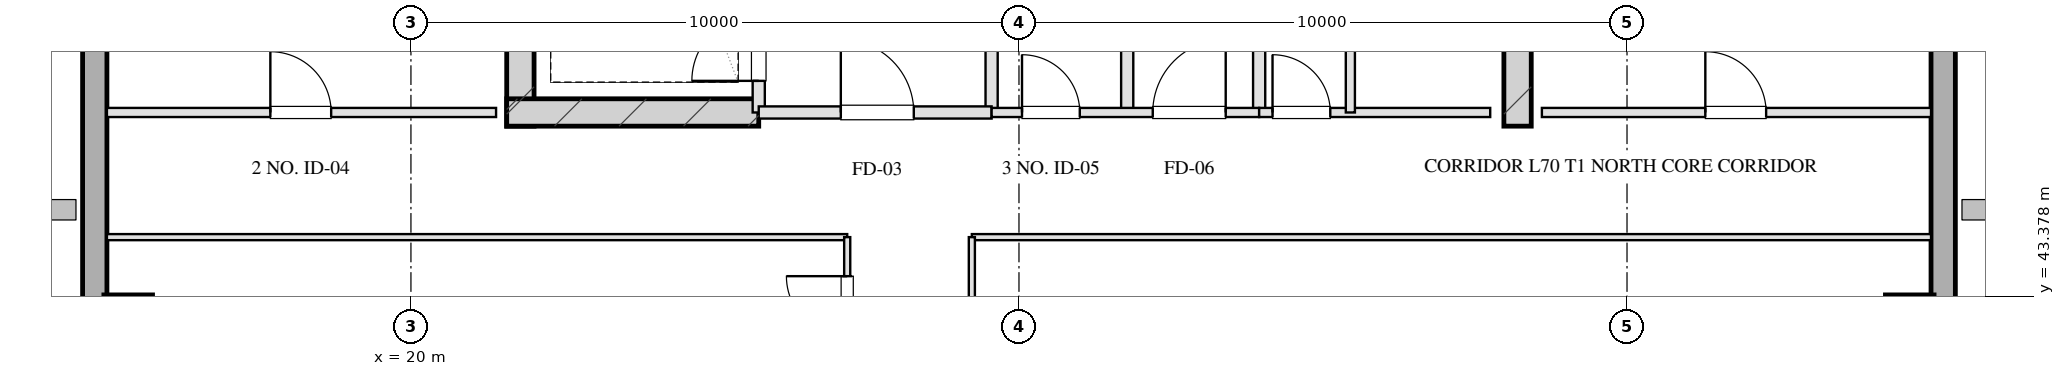
"""IFC4 building model, lengths in metres.
Left out: names, types, materials, properties, quantities, classifications, styles, units other than length and angle.
Written with IfcOpenShell. Run it as: python <this file> out.ifc"""

import sys

from ifc_helpers import new_model, si_unit, direction, frame, frame_2d, origin, origin_2d, place, context, subcontext, project, spatial, rectangle, hollow_rectangle, extrude, element, fill, save


model = new_model("IFC4")
c1 = context("Model", 3, precision=1e-05, world=origin(), true_north=direction((0.0, 1.0)))
c2 = subcontext(c1, "Body", "Model", "MODEL_VIEW")
j1 = project(units=[si_unit("LENGTHUNIT", "METRE"), si_unit("PLANEANGLEUNIT", "RADIAN")], contexts=[c1])
p1 = place(None, origin())
s1 = spatial("IfcSite", under=j1, at=p1, CompositionType="ELEMENT")
p2 = place(p1, origin())
s2 = spatial("IfcBuilding", under=s1, at=p2, CompositionType="ELEMENT")
p3 = place(p2, frame((0.0, 0.0, 256.8)))
s3 = spatial("IfcBuildingStorey", under=s2, at=p3, CompositionType="ELEMENT", Elevation=256.8)
for number, where, z_axis, x_axis in (
    (1, (21.8, 46.175, 0.0), (0.0, 0.0, 1.0), (0.0, 1.0, 0.0)),
    (2, (38.2, 46.175, 0.0), (0.0, 0.0, 1.0), (0.0, 1.0, 0.0)),
):
    element("IfcWall", number, at=place(p3, frame(where, z_axis=z_axis, x_axis=x_axis)), inside=s3, PredefinedType="SHEAR", context=c2, shape_type="SweptSolid", body=[
        extrude(rectangle(XDim=9.33, YDim=0.45, at=frame_2d((4.665, 0.0))), origin(), (0.0, 0.0, 1.0), 3.2),
    ])
p4 = place(p3, frame((21.575, 46.4, 0.0), z_axis=(0.0, 0.0, 1.0), x_axis=(1.0, 0.0, 0.0)))
e3 = element("IfcWall", 3, at=p4, inside=s3, PredefinedType="SHEAR", context=c2, shape_type="SweptSolid", body=[
    extrude(rectangle(XDim=4.145, YDim=0.45, at=frame_2d((2.073, 0.0))), origin(), (0.0, 0.0, 1.0), 3.2),
])
for number, where, z_axis, x_axis in (
    (4, (15.35, 43.0, 0.0), (0.0, 0.0, 1.0), (1.0, 0.0, 0.0)),
    (5, (44.65, 43.0, 0.0), (0.0, 0.0, 1.0), (1.0, 0.0, 0.0)),
):
    element("IfcColumn", number, at=place(p3, frame(where, z_axis=z_axis, x_axis=x_axis)), inside=s3, PredefinedType="COLUMN", context=c2, shape_type="SweptSolid", body=[
        extrude(hollow_rectangle(XDim=0.8, YDim=0.8, WallThickness=0.028, at=origin_2d()), origin(), (0.0, 0.0, 1.0), 3.201),
    ])
p5 = place(p3, frame((14.8, 13.1, 0.0), z_axis=(0.0, 0.0, 1.0), x_axis=(0.0, 1.0, 0.0)))
e6 = element("IfcWall", 6, at=p5, inside=s3, PredefinedType="SOLIDWALL", context=c2, shape_type="SweptSolid", body=[
    extrude(rectangle(XDim=41.8, YDim=0.4, at=frame_2d((20.9, 0.0))), origin(), (0.0, 0.0, 1.0), 2.36),
])
p6 = place(p5, frame((22.525, 0.0, 0.75)))
e7 = element("IfcOpeningElement", 7, at=p6, cuts=e6, PredefinedType="OPENING", context=c2, shape_type="SweptSolid", body=[
    extrude(rectangle(XDim=1.95, YDim=1.21, at=frame_2d((0.975, 0.605))), frame((0.0, 0.21, 0.0), z_axis=(0.0, -1.0, 0.0), x_axis=(1.0, 0.0, 0.0)), (0.0, 0.0, 1.0), 0.42),
])
p7 = place(p5, frame((26.325, 0.0, 0.75)))
e8 = element("IfcOpeningElement", 8, at=p7, cuts=e6, PredefinedType="OPENING", context=c2, shape_type="SweptSolid", body=[
    extrude(rectangle(XDim=1.95, YDim=1.21, at=frame_2d((0.975, 0.605))), frame((0.0, 0.21, 0.0), z_axis=(0.0, -1.0, 0.0), x_axis=(1.0, 0.0, 0.0)), (0.0, 0.0, 1.0), 0.42),
])
p8 = place(p5, frame((14.55, 0.0, 0.0)))
e9 = element("IfcOpeningElement", 9, at=p8, cuts=e6, PredefinedType="OPENING", context=c2, shape_type="SweptSolid", body=[
    extrude(rectangle(XDim=1.1, YDim=2.15, at=frame_2d((0.55, 1.075))), frame((0.0, 0.21, 0.0), z_axis=(0.0, -1.0, 0.0), x_axis=(1.0, 0.0, 0.0)), (0.0, 0.0, 1.0), 0.42),
])
p9 = place(p3, frame((45.2, 54.9, 0.0), z_axis=(0.0, 0.0, 1.0), x_axis=(0.0, -1.0, 0.0)))
e10 = element("IfcWall", 10, at=p9, inside=s3, PredefinedType="SOLIDWALL", context=c2, shape_type="SweptSolid", body=[
    extrude(rectangle(XDim=41.8, YDim=0.4, at=frame_2d((20.9, 0.0))), origin(), (0.0, 0.0, 1.0), 2.36),
])
p10 = place(p9, frame((17.325, 0.0, 0.75)))
e11 = element("IfcOpeningElement", 11, at=p10, cuts=e10, PredefinedType="OPENING", context=c2, shape_type="SweptSolid", body=[
    extrude(rectangle(XDim=1.95, YDim=1.21, at=frame_2d((0.975, 0.605))), frame((0.0, 0.21, 0.0), z_axis=(0.0, -1.0, 0.0), x_axis=(1.0, 0.0, 0.0)), (0.0, 0.0, 1.0), 0.42),
])
p11 = place(p9, frame((13.525, 0.0, 0.75)))
e12 = element("IfcOpeningElement", 12, at=p11, cuts=e10, PredefinedType="OPENING", context=c2, shape_type="SweptSolid", body=[
    extrude(rectangle(XDim=1.95, YDim=1.21, at=frame_2d((0.975, 0.605))), frame((0.0, 0.21, 0.0), z_axis=(0.0, -1.0, 0.0), x_axis=(1.0, 0.0, 0.0)), (0.0, 0.0, 1.0), 0.42),
])
p12 = place(p9, frame((23.45, 0.0, 0.0)))
e13 = element("IfcOpeningElement", 13, at=p12, cuts=e10, PredefinedType="OPENING", context=c2, shape_type="SweptSolid", body=[
    extrude(rectangle(XDim=1.1, YDim=2.15, at=frame_2d((0.55, 1.075))), frame((0.0, 0.21, 0.0), z_axis=(0.0, -1.0, 0.0), x_axis=(1.0, 0.0, 0.0)), (0.0, 0.0, 1.0), 0.42),
])
p13 = place(p3, frame((25.72, 46.4, 0.0), z_axis=(0.0, 0.0, 1.0), x_axis=(0.0, 1.0, 0.0)))
e14 = element("IfcWall", 14, at=p13, inside=s3, PredefinedType="PARTITIONING", context=c2, shape_type="SweptSolid", body=[
    extrude(rectangle(XDim=1.9, YDim=0.2, at=frame_2d((0.95, 0.0))), origin(), (0.0, 0.0, 1.0), 2.925),
])
p14 = place(p13, frame((0.52, 0.0, 0.0)))
e15 = element("IfcOpeningElement", 15, at=p14, cuts=e14, PredefinedType="OPENING", context=c2, shape_type="SweptSolid", body=[
    extrude(rectangle(XDim=1.1, YDim=2.05, at=frame_2d((0.55, 1.025))), frame((0.0, 0.11, 0.0), z_axis=(0.0, -1.0, 0.0), x_axis=(1.0, 0.0, 0.0)), (0.0, 0.0, 1.0), 0.22),
])
p15 = place(p3, frame((29.55, 46.4, 0.0), z_axis=(0.0, 0.0, 1.0), x_axis=(0.0, 1.0, 0.0)))
e16 = element("IfcWall", 16, at=p15, inside=s3, PredefinedType="PARTITIONING", context=c2, shape_type="SweptSolid", body=[
    extrude(rectangle(XDim=8.43, YDim=0.2, at=frame_2d((4.215, 0.0))), origin(), (0.0, 0.0, 1.0), 2.925),
])
p16 = place(p3, frame((25.72, 46.4, 0.0), z_axis=(0.0, 0.0, 1.0), x_axis=(1.0, 0.0, 0.0)))
e17 = element("IfcWall", 17, at=p16, inside=s3, PredefinedType="PARTITIONING", context=c2, shape_type="SweptSolid", body=[
    extrude(rectangle(XDim=3.83, YDim=0.2, at=frame_2d((1.915, 0.0))), origin(), (0.0, 0.0, 1.0), 2.925),
])
p17 = place(p16, frame((1.35, 0.0, 0.0)))
e18 = element("IfcOpeningElement", 18, at=p17, cuts=e17, PredefinedType="OPENING", context=c2, shape_type="SweptSolid", body=[
    extrude(rectangle(XDim=1.2, YDim=2.05, at=frame_2d((0.6, 1.025))), frame((0.0, 0.11, 0.0), z_axis=(0.0, -1.0, 0.0), x_axis=(1.0, 0.0, 0.0)), (0.0, 0.0, 1.0), 0.22),
])
for number, where, z_axis, x_axis in (
    (19, (33.95, 46.4, 0.0), (0.0, 0.0, 1.0), (0.0, 1.0, 0.0)),
    (20, (31.78, 46.4, 0.0), (0.0, 0.0, 1.0), (0.0, 1.0, 0.0)),
):
    element("IfcWall", number, at=place(p3, frame(where, z_axis=z_axis, x_axis=x_axis)), inside=s3, PredefinedType="PARTITIONING", context=c2, shape_type="SweptSolid", body=[
        extrude(rectangle(XDim=8.43, YDim=0.2, at=frame_2d((4.215, 0.0))), origin(), (0.0, 0.0, 1.0), 2.925),
    ])
p18 = place(p3, frame((29.55, 46.4, 0.0), z_axis=(0.0, 0.0, 1.0), x_axis=(1.0, 0.0, 0.0)))
e21 = element("IfcWall", 21, at=p18, inside=s3, PredefinedType="PARTITIONING", context=c2, shape_type="SweptSolid", body=[
    extrude(rectangle(XDim=4.4, YDim=0.15, at=frame_2d((2.2, 0.0))), origin(), (0.0, 0.0, 1.0), 2.925),
])
p19 = place(p18, frame((0.5, 0.0, 0.0)))
e22 = element("IfcOpeningElement", 22, at=p19, cuts=e21, PredefinedType="OPENING", context=c2, shape_type="SweptSolid", body=[
    extrude(rectangle(XDim=0.95, YDim=2.05, at=frame_2d((0.475, 1.025))), frame((0.0, 0.085, 0.0), z_axis=(0.0, -1.0, 0.0), x_axis=(1.0, 0.0, 0.0)), (0.0, 0.0, 1.0), 0.17),
])
p20 = place(p18, frame((2.65, 0.0, 0.0)))
e23 = element("IfcOpeningElement", 23, at=p20, cuts=e21, PredefinedType="OPENING", context=c2, shape_type="SweptSolid", body=[
    extrude(rectangle(XDim=1.2, YDim=2.05, at=frame_2d((0.6, 1.025))), frame((0.0, 0.085, 0.0), z_axis=(0.0, -1.0, 0.0), x_axis=(1.0, 0.0, 0.0)), (0.0, 0.0, 1.0), 0.17),
])
p21 = place(p3, frame((33.95, 46.4, 0.0), z_axis=(0.0, 0.0, 1.0), x_axis=(1.0, 0.0, 0.0)))
e24 = element("IfcWall", 24, at=p21, inside=s3, PredefinedType="PARTITIONING", context=c2, shape_type="SweptSolid", body=[
    extrude(rectangle(XDim=3.8, YDim=0.15, at=frame_2d((1.9, 0.0))), origin(), (0.0, 0.0, 1.0), 2.925),
])
p22 = place(p21, frame((0.22, 0.0, 0.0)))
e25 = element("IfcOpeningElement", 25, at=p22, cuts=e24, PredefinedType="OPENING", context=c2, shape_type="SweptSolid", body=[
    extrude(rectangle(XDim=0.95, YDim=2.05, at=frame_2d((0.475, 1.025))), frame((0.0, 0.085, 0.0), z_axis=(0.0, -1.0, 0.0), x_axis=(1.0, 0.0, 0.0)), (0.0, 0.0, 1.0), 0.17),
])
p23 = place(p3, frame((35.45, 46.4, 0.0), z_axis=(0.0, 0.0, 1.0), x_axis=(0.0, 1.0, 0.0)))
e26 = element("IfcWall", 26, at=p23, inside=s3, PredefinedType="PARTITIONING", context=c2, shape_type="SweptSolid", body=[
    extrude(rectangle(XDim=8.43, YDim=0.15, at=frame_2d((4.215, 0.0))), origin(), (0.0, 0.0, 1.0), 2.515),
])
p24 = place(p23, frame((2.55, 0.0, 0.0)))
e27 = element("IfcOpeningElement", 27, at=p24, cuts=e26, PredefinedType="OPENING", context=c2, shape_type="SweptSolid", body=[
    extrude(rectangle(XDim=0.95, YDim=2.05, at=frame_2d((0.475, 1.025))), frame((0.0, 0.085, 0.0), z_axis=(0.0, -1.0, 0.0), x_axis=(1.0, 0.0, 0.0)), (0.0, 0.0, 1.0), 0.17),
])
p25 = place(p23, frame((4.7, 0.0, 0.0)))
e28 = element("IfcOpeningElement", 28, at=p25, cuts=e26, PredefinedType="OPENING", context=c2, shape_type="SweptSolid", body=[
    extrude(rectangle(XDim=0.9, YDim=2.05, at=frame_2d((0.45, 1.025))), frame((0.0, 0.085, 0.0), z_axis=(0.0, -1.0, 0.0), x_axis=(1.0, 0.0, 0.0)), (0.0, 0.0, 1.0), 0.17),
])
p26 = place(p23, frame((6.8, 0.0, 0.0)))
e29 = element("IfcOpeningElement", 29, at=p26, cuts=e26, PredefinedType="OPENING", context=c2, shape_type="SweptSolid", body=[
    extrude(rectangle(XDim=0.9, YDim=2.05, at=frame_2d((0.45, 1.025))), frame((0.0, 0.085, 0.0), z_axis=(0.0, -1.0, 0.0), x_axis=(1.0, 0.0, 0.0)), (0.0, 0.0, 1.0), 0.17),
])
p27 = place(p3, frame((15.0, 46.4, 0.0), z_axis=(0.0, 0.0, 1.0), x_axis=(1.0, 0.0, 0.0)))
e30 = element("IfcWall", 30, at=p27, inside=s3, PredefinedType="PARTITIONING", context=c2, shape_type="SweptSolid", body=[
    extrude(rectangle(XDim=6.4, YDim=0.15, at=frame_2d((3.2, 0.0))), origin(), (0.0, 0.0, 1.0), 2.925),
])
p28 = place(p27, frame((2.688, 0.0, 0.0)))
e31 = element("IfcOpeningElement", 31, at=p28, cuts=e30, PredefinedType="OPENING", context=c2, shape_type="SweptSolid", body=[
    extrude(rectangle(XDim=1.0, YDim=2.05, at=frame_2d((0.5, 1.025))), frame((0.0, 0.085, 0.0), z_axis=(0.0, -1.0, 0.0), x_axis=(1.0, 0.0, 0.0)), (0.0, 0.0, 1.0), 0.17),
])
p29 = place(p3, frame((38.6, 46.4, 0.0), z_axis=(0.0, 0.0, 1.0), x_axis=(1.0, 0.0, 0.0)))
e32 = element("IfcWall", 32, at=p29, inside=s3, PredefinedType="PARTITIONING", context=c2, shape_type="SweptSolid", body=[
    extrude(rectangle(XDim=6.4, YDim=0.15, at=frame_2d((3.2, 0.0))), origin(), (0.0, 0.0, 1.0), 2.925),
])
p30 = place(p29, frame((2.688, 0.0, 0.0)))
e33 = element("IfcOpeningElement", 33, at=p30, cuts=e32, PredefinedType="OPENING", context=c2, shape_type="SweptSolid", body=[
    extrude(rectangle(XDim=1.0, YDim=2.05, at=frame_2d((0.5, 1.025))), frame((0.0, 0.085, 0.0), z_axis=(0.0, -1.0, 0.0), x_axis=(1.0, 0.0, 0.0)), (0.0, 0.0, 1.0), 0.17),
])
p31 = place(p3, frame((15.0, 44.35, 0.0), z_axis=(0.0, 0.0, 1.0), x_axis=(1.0, 0.0, 0.0)))
e34 = element("IfcWall", 34, at=p31, inside=s3, PredefinedType="MOVABLE", context=c2, shape_type="SweptSolid", body=[
    extrude(rectangle(XDim=12.175, YDim=0.1, at=frame_2d((6.087, 0.0))), origin(), (0.0, 0.0, 1.0), 2.925),
])
p32 = place(p3, frame((29.225, 44.35, 0.0), z_axis=(0.0, 0.0, 1.0), x_axis=(1.0, 0.0, 0.0)))
e35 = element("IfcWall", 35, at=p32, inside=s3, PredefinedType="MOVABLE", context=c2, shape_type="SweptSolid", body=[
    extrude(rectangle(XDim=15.775, YDim=0.1, at=frame_2d((7.887, 0.0))), origin(), (0.0, 0.0, 1.0), 2.925),
])
p33 = place(p3, frame((27.175, 23.65, 0.0), z_axis=(0.0, 0.0, 1.0), x_axis=(0.0, 1.0, 0.0)))
e36 = element("IfcWall", 36, at=p33, inside=s3, PredefinedType="MOVABLE", context=c2, shape_type="SweptSolid", body=[
    extrude(rectangle(XDim=20.7, YDim=0.1, at=frame_2d((10.35, 0.0))), origin(), (0.0, 0.0, 1.0), 2.925),
])
p34 = place(p33, frame((0.775, 0.0, 0.0)))
e37 = element("IfcOpeningElement", 37, at=p34, cuts=e36, PredefinedType="OPENING", context=c2, shape_type="SweptSolid", body=[
    extrude(rectangle(XDim=0.85, YDim=2.05, at=frame_2d((0.425, 1.025))), frame((0.0, 0.06, 0.0), z_axis=(0.0, -1.0, 0.0), x_axis=(1.0, 0.0, 0.0)), (0.0, 0.0, 1.0), 0.12),
])
p35 = place(p33, frame((3.95, 0.0, 0.0)))
e38 = element("IfcOpeningElement", 38, at=p35, cuts=e36, PredefinedType="OPENING", context=c2, shape_type="SweptSolid", body=[
    extrude(rectangle(XDim=1.0, YDim=2.05, at=frame_2d((0.5, 1.025))), frame((0.0, 0.06, 0.0), z_axis=(0.0, -1.0, 0.0), x_axis=(1.0, 0.0, 0.0)), (0.0, 0.0, 1.0), 0.12),
])
p36 = place(p33, frame((8.364, 0.0, 0.0)))
e39 = element("IfcOpeningElement", 39, at=p36, cuts=e36, PredefinedType="OPENING", context=c2, shape_type="SweptSolid", body=[
    extrude(rectangle(XDim=1.05, YDim=2.05, at=frame_2d((0.525, 1.025))), frame((0.0, 0.06, 0.0), z_axis=(0.0, -1.0, 0.0), x_axis=(1.0, 0.0, 0.0)), (0.0, 0.0, 1.0), 0.12),
])
p37 = place(p33, frame((12.844, 0.0, 0.0)))
e40 = element("IfcOpeningElement", 40, at=p37, cuts=e36, PredefinedType="OPENING", context=c2, shape_type="SweptSolid", body=[
    extrude(rectangle(XDim=1.0, YDim=2.05, at=frame_2d((0.5, 1.025))), frame((0.0, 0.06, 0.0), z_axis=(0.0, -1.0, 0.0), x_axis=(1.0, 0.0, 0.0)), (0.0, 0.0, 1.0), 0.12),
])
p38 = place(p33, frame((16.364, 0.0, 0.0)))
e41 = element("IfcOpeningElement", 41, at=p38, cuts=e36, PredefinedType="OPENING", context=c2, shape_type="SweptSolid", body=[
    extrude(rectangle(XDim=1.0, YDim=2.05, at=frame_2d((0.5, 1.025))), frame((0.0, 0.06, 0.0), z_axis=(0.0, -1.0, 0.0), x_axis=(1.0, 0.0, 0.0)), (0.0, 0.0, 1.0), 0.12),
])
p39 = place(p33, frame((19.058, 0.0, 0.0)))
e42 = element("IfcOpeningElement", 42, at=p39, cuts=e36, PredefinedType="OPENING", context=c2, shape_type="SweptSolid", body=[
    extrude(rectangle(XDim=1.0, YDim=2.05, at=frame_2d((0.5, 1.025))), frame((0.0, 0.06, 0.0), z_axis=(0.0, -1.0, 0.0), x_axis=(1.0, 0.0, 0.0)), (0.0, 0.0, 1.0), 0.12),
])
p40 = place(p3, frame((29.225, 23.65, 0.0), z_axis=(0.0, 0.0, 1.0), x_axis=(0.0, 1.0, 0.0)))
e43 = element("IfcWall", 43, at=p40, inside=s3, PredefinedType="MOVABLE", context=c2, shape_type="SweptSolid", body=[
    extrude(rectangle(XDim=20.7, YDim=0.1, at=frame_2d((10.35, 0.0))), origin(), (0.0, 0.0, 1.0), 2.925),
])
p41 = place(p40, frame((2.175, 0.0, 0.0)))
e44 = element("IfcOpeningElement", 44, at=p41, cuts=e43, PredefinedType="OPENING", context=c2, shape_type="SweptSolid", body=[
    extrude(rectangle(XDim=1.0, YDim=2.05, at=frame_2d((0.5, 1.025))), frame((0.0, 0.06, 0.0), z_axis=(0.0, -1.0, 0.0), x_axis=(1.0, 0.0, 0.0)), (0.0, 0.0, 1.0), 0.12),
])
p42 = place(p40, frame((7.69, 0.0, 0.0)))
e45 = element("IfcOpeningElement", 45, at=p42, cuts=e43, PredefinedType="OPENING", context=c2, shape_type="SweptSolid", body=[
    extrude(rectangle(XDim=1.0, YDim=2.05, at=frame_2d((0.5, 1.025))), frame((0.0, 0.06, 0.0), z_axis=(0.0, -1.0, 0.0), x_axis=(1.0, 0.0, 0.0)), (0.0, 0.0, 1.0), 0.12),
])
p43 = place(p40, frame((12.69, 0.0, 0.0)))
e46 = element("IfcOpeningElement", 46, at=p43, cuts=e43, PredefinedType="OPENING", context=c2, shape_type="SweptSolid", body=[
    extrude(rectangle(XDim=1.0, YDim=2.05, at=frame_2d((0.5, 1.025))), frame((0.0, 0.06, 0.0), z_axis=(0.0, -1.0, 0.0), x_axis=(1.0, 0.0, 0.0)), (0.0, 0.0, 1.0), 0.12),
])
p44 = place(p40, frame((17.525, 0.0, 0.0)))
e47 = element("IfcOpeningElement", 47, at=p44, cuts=e43, PredefinedType="OPENING", context=c2, shape_type="SweptSolid", body=[
    extrude(rectangle(XDim=1.05, YDim=2.05, at=frame_2d((0.525, 1.025))), frame((0.0, 0.06, 0.0), z_axis=(0.0, -1.0, 0.0), x_axis=(1.0, 0.0, 0.0)), (0.0, 0.0, 1.0), 0.12),
])
p45 = place(p14, origin())
e48 = element("IfcDoor", 48, at=p45, inside=s3, OperationType="SINGLE_SWING_LEFT", PredefinedType="DOOR", context=c2, shape_type="SweptSolid", body=[
    extrude(rectangle(XDim=1.1, YDim=2.05, at=frame_2d((0.55, 1.025))), frame((0.0, 0.025, 0.0), z_axis=(0.0, -1.0, 0.0), x_axis=(1.0, 0.0, 0.0)), (0.0, 0.0, 1.0), 0.05),
])
fill(e15, e48)
p46 = place(p17, origin())
e49 = element("IfcDoor", 49, at=p46, inside=s3, OperationType="SINGLE_SWING_LEFT", PredefinedType="DOOR", context=c2, shape_type="SweptSolid", body=[
    extrude(rectangle(XDim=1.2, YDim=2.05, at=frame_2d((0.6, 1.025))), frame((0.0, 0.025, 0.0), z_axis=(0.0, -1.0, 0.0), x_axis=(1.0, 0.0, 0.0)), (0.0, 0.0, 1.0), 0.05),
])
fill(e18, e49)
p47 = place(p19, origin())
e50 = element("IfcDoor", 50, at=p47, inside=s3, OperationType="SINGLE_SWING_LEFT", PredefinedType="DOOR", context=c2, shape_type="SweptSolid", body=[
    extrude(rectangle(XDim=0.95, YDim=2.05, at=frame_2d((0.475, 1.025))), frame((0.0, 0.025, 0.0), z_axis=(0.0, -1.0, 0.0), x_axis=(1.0, 0.0, 0.0)), (0.0, 0.0, 1.0), 0.05),
])
fill(e22, e50)
p48 = place(p20, origin())
e51 = element("IfcDoor", 51, at=p48, inside=s3, OperationType="SINGLE_SWING_RIGHT", PredefinedType="DOOR", context=c2, shape_type="SweptSolid", body=[
    extrude(rectangle(XDim=1.2, YDim=2.05, at=frame_2d((0.6, 1.025))), frame((0.0, 0.025, 0.0), z_axis=(0.0, -1.0, 0.0), x_axis=(1.0, 0.0, 0.0)), (0.0, 0.0, 1.0), 0.05),
])
fill(e23, e51)
p49 = place(p22, origin())
e52 = element("IfcDoor", 52, at=p49, inside=s3, OperationType="SINGLE_SWING_LEFT", PredefinedType="DOOR", context=c2, shape_type="SweptSolid", body=[
    extrude(rectangle(XDim=0.95, YDim=2.05, at=frame_2d((0.475, 1.025))), frame((0.0, 0.025, 0.0), z_axis=(0.0, -1.0, 0.0), x_axis=(1.0, 0.0, 0.0)), (0.0, 0.0, 1.0), 0.05),
])
fill(e25, e52)
p50 = place(p28, origin())
e53 = element("IfcDoor", 53, at=p50, inside=s3, OperationType="SINGLE_SWING_LEFT", PredefinedType="DOOR", context=c2, shape_type="SweptSolid", body=[
    extrude(rectangle(XDim=1.0, YDim=2.05, at=frame_2d((0.5, 1.025))), frame((0.0, 0.025, 0.0), z_axis=(0.0, -1.0, 0.0), x_axis=(1.0, 0.0, 0.0)), (0.0, 0.0, 1.0), 0.05),
])
fill(e31, e53)
p51 = place(p30, origin())
e54 = element("IfcDoor", 54, at=p51, inside=s3, OperationType="SINGLE_SWING_LEFT", PredefinedType="DOOR", context=c2, shape_type="SweptSolid", body=[
    extrude(rectangle(XDim=1.0, YDim=2.05, at=frame_2d((0.5, 1.025))), frame((0.0, 0.025, 0.0), z_axis=(0.0, -1.0, 0.0), x_axis=(1.0, 0.0, 0.0)), (0.0, 0.0, 1.0), 0.05),
])
fill(e33, e54)
p52 = place(p39, origin())
e55 = element("IfcDoor", 55, at=p52, inside=s3, OperationType="SINGLE_SWING_RIGHT", PredefinedType="DOOR", context=c2, shape_type="SweptSolid", body=[
    extrude(rectangle(XDim=1.0, YDim=2.05, at=frame_2d((0.5, 1.025))), frame((0.0, 0.025, 0.0), z_axis=(0.0, -1.0, 0.0), x_axis=(1.0, 0.0, 0.0)), (0.0, 0.0, 1.0), 0.05),
])
fill(e42, e55)
save(model, sys.argv[1])
